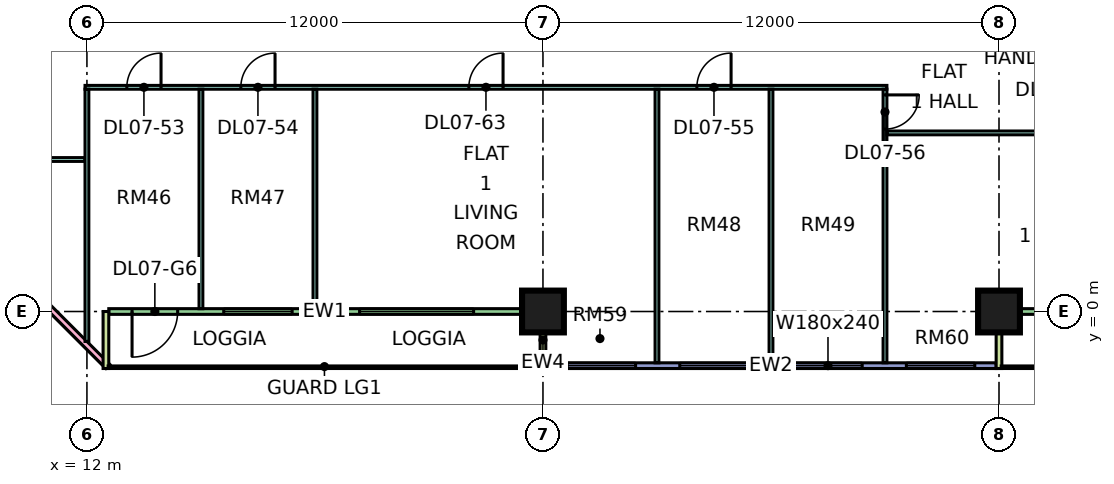
"""IFC4 building model, lengths in metres.
Left out: names, types, materials, properties, quantities, classifications, styles, units other than length and angle.
Written with IfcOpenShell. Run it as: python <this file> out.ifc"""

import sys

from ifc_helpers import new_model, si_unit, direction, frame, frame_2d, origin, origin_2d, place, context, subcontext, project, spatial, rectangle, extrude, element, fill, save


model = new_model("IFC4")
c1 = context("Model", 3, precision=1e-05, world=origin(), true_north=direction((0.0, 1.0)))
c2 = subcontext(c1, "Body", "Model", "MODEL_VIEW")
j1 = project(units=[si_unit("LENGTHUNIT", "METRE"), si_unit("PLANEANGLEUNIT", "RADIAN")], contexts=[c1])
p1 = place(None, origin())
s1 = spatial("IfcSite", under=j1, at=p1, CompositionType="ELEMENT")
p2 = place(p1, origin())
s2 = spatial("IfcBuilding", under=s1, at=p2, CompositionType="ELEMENT")
p3 = place(p2, frame((0.0, 0.0, 41.4)))
s3 = spatial("IfcBuildingStorey", under=s2, at=p3, CompositionType="ELEMENT", Elevation=41.4)
for number, where, z_axis, x_axis in (
    (1, (24.0, 0.0, 0.0), (0.0, 0.0, 1.0), (1.0, 0.0, 0.0)),
    (2, (36.0, 0.0, 0.0), (0.0, 0.0, 1.0), (1.0, 0.0, 0.0)),
):
    element("IfcColumn", number, at=place(p3, frame(where, z_axis=z_axis, x_axis=x_axis)), inside=s3, PredefinedType="COLUMN", context=c2, shape_type="SweptSolid", body=[
        extrude(rectangle(XDim=1.1, YDim=1.1, at=origin_2d()), origin(), (0.0, 0.0, 1.0), 3.75),
    ])
p4 = place(p3, frame((-1.447, 12.553, 0.0), z_axis=(0.0, 0.0, 1.0), x_axis=(0.707106781187, -0.707106781187, 0.0)))
e3 = element("IfcWall", 3, at=p4, inside=s3, PredefinedType="SOLIDWALL", context=c2, shape_type="SweptSolid", body=[
    extrude(rectangle(XDim=19.799, YDim=0.15, at=frame_2d((9.899, 0.0))), origin(), (0.0, 0.0, 1.0), 3.35),
])
p5 = place(p4, frame((2.212, 0.0, 0.45)))
e4 = element("IfcOpeningElement", 4, at=p5, cuts=e3, PredefinedType="OPENING", context=c2, shape_type="SweptSolid", body=[
    extrude(rectangle(XDim=3.0, YDim=2.4, at=frame_2d((1.5, 1.2))), frame((0.0, 0.085, 0.0), z_axis=(0.0, -1.0, 0.0), x_axis=(1.0, 0.0, 0.0)), (0.0, 0.0, 1.0), 0.17),
])
p6 = place(p4, frame((10.216, 0.0, 0.45)))
e5 = element("IfcOpeningElement", 5, at=p6, cuts=e3, PredefinedType="OPENING", context=c2, shape_type="SweptSolid", body=[
    extrude(rectangle(XDim=3.0, YDim=2.4, at=frame_2d((1.5, 1.2))), frame((0.0, 0.085, 0.0), z_axis=(0.0, -1.0, 0.0), x_axis=(1.0, 0.0, 0.0)), (0.0, 0.0, 1.0), 0.17),
])
p7 = place(p3, frame((12.575, 0.0, 0.0), z_axis=(0.0, 0.0, 1.0), x_axis=(1.0, 0.0, 0.0)))
e6 = element("IfcWall", 6, at=p7, inside=s3, PredefinedType="SOLIDWALL", context=c2, shape_type="SweptSolid", body=[
    extrude(rectangle(XDim=11.35, YDim=0.15, at=frame_2d((5.675, 0.0))), origin(), (0.0, 0.0, 1.0), 3.35),
])
p8 = place(p7, frame((0.613, 0.0, 0.0)))
e7 = element("IfcOpeningElement", 7, at=p8, cuts=e6, PredefinedType="OPENING", context=c2, shape_type="SweptSolid", body=[
    extrude(rectangle(XDim=1.2, YDim=2.4, at=frame_2d((0.6, 1.2))), frame((0.0, 0.085, 0.0), z_axis=(0.0, -1.0, 0.0), x_axis=(1.0, 0.0, 0.0)), (0.0, 0.0, 1.0), 0.17),
])
p9 = place(p7, frame((3.025, 0.0, 0.45)))
e8 = element("IfcOpeningElement", 8, at=p9, cuts=e6, PredefinedType="OPENING", context=c2, shape_type="SweptSolid", body=[
    extrude(rectangle(XDim=1.8, YDim=2.4, at=frame_2d((0.9, 1.2))), frame((0.0, 0.085, 0.0), z_axis=(0.0, -1.0, 0.0), x_axis=(1.0, 0.0, 0.0)), (0.0, 0.0, 1.0), 0.17),
])
p10 = place(p7, frame((6.6, 0.0, 0.45)))
e9 = element("IfcOpeningElement", 9, at=p10, cuts=e6, PredefinedType="OPENING", context=c2, shape_type="SweptSolid", body=[
    extrude(rectangle(XDim=3.0, YDim=2.4, at=frame_2d((1.5, 1.2))), frame((0.0, 0.085, 0.0), z_axis=(0.0, -1.0, 0.0), x_axis=(1.0, 0.0, 0.0)), (0.0, 0.0, 1.0), 0.17),
])
for number, where, z_axis, x_axis in (
    (10, (12.5, -1.5, 0.0), (0.0, 0.0, 1.0), (0.0, 1.0, 0.0)),
    (11, (24.0, -1.5, 0.0), (0.0, 0.0, 1.0), (0.0, 1.0, 0.0)),
):
    element("IfcWall", number, at=place(p3, frame(where, z_axis=z_axis, x_axis=x_axis)), inside=s3, PredefinedType="SOLIDWALL", context=c2, shape_type="SweptSolid", body=[
        extrude(rectangle(XDim=1.5, YDim=0.15, at=frame_2d((0.75, 0.0))), origin(), (0.0, 0.0, 1.0), 3.35),
    ])
p11 = place(p3, frame((24.075, -1.425, 0.0), z_axis=(0.0, 0.0, 1.0), x_axis=(1.0, 0.0, 0.0)))
e12 = element("IfcWall", 12, at=p11, inside=s3, PredefinedType="SOLIDWALL", context=c2, shape_type="SweptSolid", body=[
    extrude(rectangle(XDim=11.85, YDim=0.15, at=frame_2d((5.925, 0.0))), origin(), (0.0, 0.0, 1.0), 3.35),
])
p12 = place(p11, frame((0.562, 0.0, 0.45)))
e13 = element("IfcOpeningElement", 13, at=p12, cuts=e12, PredefinedType="OPENING", context=c2, shape_type="SweptSolid", body=[
    extrude(rectangle(XDim=1.8, YDim=2.4, at=frame_2d((0.9, 1.2))), frame((0.0, 0.085, 0.0), z_axis=(0.0, -1.0, 0.0), x_axis=(1.0, 0.0, 0.0)), (0.0, 0.0, 1.0), 0.17),
])
p13 = place(p11, frame((3.525, 0.0, 0.45)))
e14 = element("IfcOpeningElement", 14, at=p13, cuts=e12, PredefinedType="OPENING", context=c2, shape_type="SweptSolid", body=[
    extrude(rectangle(XDim=1.8, YDim=2.4, at=frame_2d((0.9, 1.2))), frame((0.0, 0.085, 0.0), z_axis=(0.0, -1.0, 0.0), x_axis=(1.0, 0.0, 0.0)), (0.0, 0.0, 1.0), 0.17),
])
p14 = place(p11, frame((6.525, 0.0, 0.45)))
e15 = element("IfcOpeningElement", 15, at=p14, cuts=e12, PredefinedType="OPENING", context=c2, shape_type="SweptSolid", body=[
    extrude(rectangle(XDim=1.8, YDim=2.4, at=frame_2d((0.9, 1.2))), frame((0.0, 0.085, 0.0), z_axis=(0.0, -1.0, 0.0), x_axis=(1.0, 0.0, 0.0)), (0.0, 0.0, 1.0), 0.17),
])
p15 = place(p11, frame((9.488, 0.0, 0.45)))
e16 = element("IfcOpeningElement", 16, at=p15, cuts=e12, PredefinedType="OPENING", context=c2, shape_type="SweptSolid", body=[
    extrude(rectangle(XDim=1.8, YDim=2.4, at=frame_2d((0.9, 1.2))), frame((0.0, 0.085, 0.0), z_axis=(0.0, -1.0, 0.0), x_axis=(1.0, 0.0, 0.0)), (0.0, 0.0, 1.0), 0.17),
])
p16 = place(p3, frame((36.075, 0.0, 0.0), z_axis=(0.0, 0.0, 1.0), x_axis=(1.0, 0.0, 0.0)))
e17 = element("IfcWall", 17, at=p16, inside=s3, PredefinedType="SOLIDWALL", context=c2, shape_type="SweptSolid", body=[
    extrude(rectangle(XDim=11.85, YDim=0.15, at=frame_2d((5.925, 0.0))), origin(), (0.0, 0.0, 1.0), 3.35),
])
p17 = place(p16, frame((2.35, 0.0, 0.0)))
e18 = element("IfcOpeningElement", 18, at=p17, cuts=e17, PredefinedType="OPENING", context=c2, shape_type="SweptSolid", body=[
    extrude(rectangle(XDim=1.8, YDim=2.4, at=frame_2d((0.9, 1.2))), frame((0.0, 0.085, 0.0), z_axis=(0.0, -1.0, 0.0), x_axis=(1.0, 0.0, 0.0)), (0.0, 0.0, 1.0), 0.17),
])
p18 = place(p16, frame((6.5, 0.0, 0.45)))
e19 = element("IfcOpeningElement", 19, at=p18, cuts=e17, PredefinedType="OPENING", context=c2, shape_type="SweptSolid", body=[
    extrude(rectangle(XDim=1.2, YDim=2.4, at=frame_2d((0.6, 1.2))), frame((0.0, 0.085, 0.0), z_axis=(0.0, -1.0, 0.0), x_axis=(1.0, 0.0, 0.0)), (0.0, 0.0, 1.0), 0.17),
])
p19 = place(p16, frame((10.113, 0.0, 0.45)))
e20 = element("IfcOpeningElement", 20, at=p19, cuts=e17, PredefinedType="OPENING", context=c2, shape_type="SweptSolid", body=[
    extrude(rectangle(XDim=1.2, YDim=2.4, at=frame_2d((0.6, 1.2))), frame((0.0, 0.085, 0.0), z_axis=(0.0, -1.0, 0.0), x_axis=(1.0, 0.0, 0.0)), (0.0, 0.0, 1.0), 0.17),
])
p20 = place(p3, frame((36.0, -1.5, 0.0), z_axis=(0.0, 0.0, 1.0), x_axis=(0.0, 1.0, 0.0)))
e21 = element("IfcWall", 21, at=p20, inside=s3, PredefinedType="SOLIDWALL", context=c2, shape_type="SweptSolid", body=[
    extrude(rectangle(XDim=1.5, YDim=0.15, at=frame_2d((0.75, 0.0))), origin(), (0.0, 0.0, 1.0), 3.35),
])
p21 = place(p3, frame((9.05, 4.0, 0.0), z_axis=(0.0, 0.0, 1.0), x_axis=(1.0, 0.0, 0.0)))
e22 = element("IfcWall", 22, at=p21, inside=s3, PredefinedType="PARTITIONING", context=c2, shape_type="SweptSolid", body=[
    extrude(rectangle(XDim=2.9, YDim=0.1, at=frame_2d((1.45, 0.0))), origin(), (0.0, 0.0, 1.0), 3.35),
])
p22 = place(p3, frame((11.95, 5.9, 0.0), z_axis=(0.0, 0.0, 1.0), x_axis=(1.0, 0.0, 0.0)))
e23 = element("IfcWall", 23, at=p22, inside=s3, PredefinedType="PARTITIONING", context=c2, shape_type="SweptSolid", body=[
    extrude(rectangle(XDim=21.1, YDim=0.1, at=frame_2d((10.55, 0.0))), origin(), (0.0, 0.0, 1.0), 3.35),
])
p23 = place(p22, frame((1.1, 0.0, 0.0)))
e24 = element("IfcOpeningElement", 24, at=p23, cuts=e23, PredefinedType="OPENING", context=c2, shape_type="SweptSolid", body=[
    extrude(rectangle(XDim=0.9, YDim=2.1, at=frame_2d((0.45, 1.05))), frame((0.0, 0.06, 0.0), z_axis=(0.0, -1.0, 0.0), x_axis=(1.0, 0.0, 0.0)), (0.0, 0.0, 1.0), 0.12),
])
p24 = place(p22, frame((4.1, 0.0, 0.0)))
e25 = element("IfcOpeningElement", 25, at=p24, cuts=e23, PredefinedType="OPENING", context=c2, shape_type="SweptSolid", body=[
    extrude(rectangle(XDim=0.9, YDim=2.1, at=frame_2d((0.45, 1.05))), frame((0.0, 0.06, 0.0), z_axis=(0.0, -1.0, 0.0), x_axis=(1.0, 0.0, 0.0)), (0.0, 0.0, 1.0), 0.12),
])
p25 = place(p22, frame((16.1, 0.0, 0.0)))
e26 = element("IfcOpeningElement", 26, at=p25, cuts=e23, PredefinedType="OPENING", context=c2, shape_type="SweptSolid", body=[
    extrude(rectangle(XDim=0.9, YDim=2.1, at=frame_2d((0.45, 1.05))), frame((0.0, 0.06, 0.0), z_axis=(0.0, -1.0, 0.0), x_axis=(1.0, 0.0, 0.0)), (0.0, 0.0, 1.0), 0.12),
])
p26 = place(p22, frame((10.1, 0.0, 0.0)))
e27 = element("IfcOpeningElement", 27, at=p26, cuts=e23, PredefinedType="OPENING", context=c2, shape_type="SweptSolid", body=[
    extrude(rectangle(XDim=0.9, YDim=2.1, at=frame_2d((0.45, 1.05))), frame((0.0, 0.06, 0.0), z_axis=(0.0, -1.0, 0.0), x_axis=(1.0, 0.0, 0.0)), (0.0, 0.0, 1.0), 0.12),
])
p27 = place(p3, frame((12.0, -0.788, 0.0), z_axis=(0.0, 0.0, 1.0), x_axis=(0.0, 1.0, 0.0)))
e28 = element("IfcWall", 28, at=p27, inside=s3, PredefinedType="PARTITIONING", context=c2, shape_type="SweptSolid", body=[
    extrude(rectangle(XDim=6.638, YDim=0.1, at=frame_2d((3.319, 0.0))), origin(), (0.0, 0.0, 1.0), 3.35),
])
for number, where, z_axis, x_axis in (
    (29, (15.0, 0.074, 0.0), (0.0, 0.0, 1.0), (0.0, 1.0, 0.0)),
    (30, (18.0, 0.074, 0.0), (0.0, 0.0, 1.0), (0.0, 1.0, 0.0)),
):
    element("IfcWall", number, at=place(p3, frame(where, z_axis=z_axis, x_axis=x_axis)), inside=s3, PredefinedType="PARTITIONING", context=c2, shape_type="SweptSolid", body=[
        extrude(rectangle(XDim=5.776, YDim=0.1, at=frame_2d((2.888, 0.0))), origin(), (0.0, 0.0, 1.0), 3.35),
    ])
p28 = place(p3, frame((27.0, -1.35, 0.0), z_axis=(0.0, 0.0, 1.0), x_axis=(0.0, 1.0, 0.0)))
e31 = element("IfcWall", 31, at=p28, inside=s3, PredefinedType="PARTITIONING", context=c2, shape_type="SweptSolid", body=[
    extrude(rectangle(XDim=7.2, YDim=0.1, at=frame_2d((3.6, 0.0))), origin(), (0.0, 0.0, 1.0), 3.35),
])
p29 = place(p3, frame((30.0, -1.351, 0.0), z_axis=(0.0, 0.0, 1.0), x_axis=(0.0, 1.0, 0.0)))
e32 = element("IfcWall", 32, at=p29, inside=s3, PredefinedType="PARTITIONING", context=c2, shape_type="SweptSolid", body=[
    extrude(rectangle(XDim=7.201, YDim=0.1, at=frame_2d((3.601, 0.0))), origin(), (0.0, 0.0, 1.0), 3.35),
])
p30 = place(p3, frame((33.0, -1.35, 0.0), z_axis=(0.0, 0.0, 1.0), x_axis=(0.0, 1.0, 0.0)))
e33 = element("IfcWall", 33, at=p30, inside=s3, PredefinedType="PARTITIONING", context=c2, shape_type="SweptSolid", body=[
    extrude(rectangle(XDim=7.2, YDim=0.1, at=frame_2d((3.6, 0.0))), origin(), (0.0, 0.0, 1.0), 3.35),
])
p31 = place(p30, frame((6.15, 0.0, 0.0)))
e34 = element("IfcOpeningElement", 34, at=p31, cuts=e33, PredefinedType="OPENING", context=c2, shape_type="SweptSolid", body=[
    extrude(rectangle(XDim=0.9, YDim=2.1, at=frame_2d((0.45, 1.05))), frame((0.0, 0.06, 0.0), z_axis=(0.0, -1.0, 0.0), x_axis=(1.0, 0.0, 0.0)), (0.0, 0.0, 1.0), 0.12),
])
p32 = place(p3, frame((33.05, 4.7, 0.0), z_axis=(0.0, 0.0, 1.0), x_axis=(1.0, 0.0, 0.0)))
e35 = element("IfcWall", 35, at=p32, inside=s3, PredefinedType="PARTITIONING", context=c2, shape_type="SweptSolid", body=[
    extrude(rectangle(XDim=14.85, YDim=0.1, at=frame_2d((7.425, 0.0))), origin(), (0.0, 0.0, 1.0), 3.35),
])
p33 = place(p32, frame((10.0, 0.0, 0.0)))
e36 = element("IfcOpeningElement", 36, at=p33, cuts=e35, PredefinedType="OPENING", context=c2, shape_type="SweptSolid", body=[
    extrude(rectangle(XDim=0.9, YDim=2.1, at=frame_2d((0.45, 1.05))), frame((0.0, 0.06, 0.0), z_axis=(0.0, -1.0, 0.0), x_axis=(1.0, 0.0, 0.0)), (0.0, 0.0, 1.0), 0.12),
])
p34 = place(p32, frame((13.0, 0.0, 0.0)))
e37 = element("IfcOpeningElement", 37, at=p34, cuts=e35, PredefinedType="OPENING", context=c2, shape_type="SweptSolid", body=[
    extrude(rectangle(XDim=0.9, YDim=2.1, at=frame_2d((0.45, 1.05))), frame((0.0, 0.06, 0.0), z_axis=(0.0, -1.0, 0.0), x_axis=(1.0, 0.0, 0.0)), (0.0, 0.0, 1.0), 0.12),
])
p35 = place(p32, frame((4.0, 0.0, 0.0)))
e38 = element("IfcOpeningElement", 38, at=p35, cuts=e35, PredefinedType="OPENING", context=c2, shape_type="SweptSolid", body=[
    extrude(rectangle(XDim=0.9, YDim=2.1, at=frame_2d((0.45, 1.05))), frame((0.0, 0.06, 0.0), z_axis=(0.0, -1.0, 0.0), x_axis=(1.0, 0.0, 0.0)), (0.0, 0.0, 1.0), 0.12),
])
p36 = place(p8, frame((1.2, 0.0, 0.0), z_axis=(0.0, 0.0, 1.0), x_axis=(-1.0, 0.0, 0.0)))
e39 = element("IfcDoor", 39, at=p36, inside=s3, OperationType="DOUBLE_DOOR_SINGLE_SWING", PredefinedType="DOOR", context=c2, shape_type="SweptSolid", body=[
    extrude(rectangle(XDim=1.2, YDim=2.4, at=frame_2d((0.6, 1.2))), frame((0.0, 0.025, 0.0), z_axis=(0.0, -1.0, 0.0), x_axis=(1.0, 0.0, 0.0)), (0.0, 0.0, 1.0), 0.05),
])
fill(e7, e39)
p37 = place(p9, origin())
e40 = element("IfcWindow", 40, at=p37, inside=s3, PartitioningType="SINGLE_PANEL", PredefinedType="WINDOW", context=c2, shape_type="SweptSolid", body=[
    extrude(rectangle(XDim=1.8, YDim=2.4, at=frame_2d((0.9, 1.2))), frame((0.0, 0.03, 0.0), z_axis=(0.0, -1.0, 0.0), x_axis=(1.0, 0.0, 0.0)), (0.0, 0.0, 1.0), 0.06),
])
fill(e8, e40)
p38 = place(p10, origin())
e41 = element("IfcWindow", 41, at=p38, inside=s3, PartitioningType="SINGLE_PANEL", PredefinedType="WINDOW", context=c2, shape_type="SweptSolid", body=[
    extrude(rectangle(XDim=3.0, YDim=2.4, at=frame_2d((1.5, 1.2))), frame((0.0, 0.03, 0.0), z_axis=(0.0, -1.0, 0.0), x_axis=(1.0, 0.0, 0.0)), (0.0, 0.0, 1.0), 0.06),
])
fill(e9, e41)
p39 = place(p12, origin())
e42 = element("IfcWindow", 42, at=p39, inside=s3, PartitioningType="SINGLE_PANEL", PredefinedType="WINDOW", context=c2, shape_type="SweptSolid", body=[
    extrude(rectangle(XDim=1.8, YDim=2.4, at=frame_2d((0.9, 1.2))), frame((0.0, 0.03, 0.0), z_axis=(0.0, -1.0, 0.0), x_axis=(1.0, 0.0, 0.0)), (0.0, 0.0, 1.0), 0.06),
])
fill(e13, e42)
p40 = place(p13, origin())
e43 = element("IfcWindow", 43, at=p40, inside=s3, PartitioningType="SINGLE_PANEL", PredefinedType="WINDOW", context=c2, shape_type="SweptSolid", body=[
    extrude(rectangle(XDim=1.8, YDim=2.4, at=frame_2d((0.9, 1.2))), frame((0.0, 0.03, 0.0), z_axis=(0.0, -1.0, 0.0), x_axis=(1.0, 0.0, 0.0)), (0.0, 0.0, 1.0), 0.06),
])
fill(e14, e43)
p41 = place(p14, origin())
e44 = element("IfcWindow", 44, at=p41, inside=s3, PartitioningType="SINGLE_PANEL", PredefinedType="WINDOW", context=c2, shape_type="SweptSolid", body=[
    extrude(rectangle(XDim=1.8, YDim=2.4, at=frame_2d((0.9, 1.2))), frame((0.0, 0.03, 0.0), z_axis=(0.0, -1.0, 0.0), x_axis=(1.0, 0.0, 0.0)), (0.0, 0.0, 1.0), 0.06),
])
fill(e15, e44)
p42 = place(p15, origin())
e45 = element("IfcWindow", 45, at=p42, inside=s3, PartitioningType="SINGLE_PANEL", PredefinedType="WINDOW", context=c2, shape_type="SweptSolid", body=[
    extrude(rectangle(XDim=1.8, YDim=2.4, at=frame_2d((0.9, 1.2))), frame((0.0, 0.03, 0.0), z_axis=(0.0, -1.0, 0.0), x_axis=(1.0, 0.0, 0.0)), (0.0, 0.0, 1.0), 0.06),
])
fill(e16, e45)
p43 = place(p23, frame((0.9, 0.0, 0.0), z_axis=(0.0, 0.0, 1.0), x_axis=(-1.0, 0.0, 0.0)))
e46 = element("IfcDoor", 46, at=p43, inside=s3, OperationType="SINGLE_SWING_RIGHT", PredefinedType="DOOR", context=c2, shape_type="SweptSolid", body=[
    extrude(rectangle(XDim=0.9, YDim=2.1, at=frame_2d((0.45, 1.05))), frame((0.0, 0.025, 0.0), z_axis=(0.0, -1.0, 0.0), x_axis=(1.0, 0.0, 0.0)), (0.0, 0.0, 1.0), 0.05),
])
fill(e24, e46)
p44 = place(p24, frame((0.9, 0.0, 0.0), z_axis=(0.0, 0.0, 1.0), x_axis=(-1.0, 0.0, 0.0)))
e47 = element("IfcDoor", 47, at=p44, inside=s3, OperationType="SINGLE_SWING_RIGHT", PredefinedType="DOOR", context=c2, shape_type="SweptSolid", body=[
    extrude(rectangle(XDim=0.9, YDim=2.1, at=frame_2d((0.45, 1.05))), frame((0.0, 0.025, 0.0), z_axis=(0.0, -1.0, 0.0), x_axis=(1.0, 0.0, 0.0)), (0.0, 0.0, 1.0), 0.05),
])
fill(e25, e47)
p45 = place(p25, frame((0.9, 0.0, 0.0), z_axis=(0.0, 0.0, 1.0), x_axis=(-1.0, 0.0, 0.0)))
e48 = element("IfcDoor", 48, at=p45, inside=s3, OperationType="SINGLE_SWING_RIGHT", PredefinedType="DOOR", context=c2, shape_type="SweptSolid", body=[
    extrude(rectangle(XDim=0.9, YDim=2.1, at=frame_2d((0.45, 1.05))), frame((0.0, 0.025, 0.0), z_axis=(0.0, -1.0, 0.0), x_axis=(1.0, 0.0, 0.0)), (0.0, 0.0, 1.0), 0.05),
])
fill(e26, e48)
p46 = place(p31, origin())
e49 = element("IfcDoor", 49, at=p46, inside=s3, OperationType="SINGLE_SWING_RIGHT", PredefinedType="DOOR", context=c2, shape_type="SweptSolid", body=[
    extrude(rectangle(XDim=0.9, YDim=2.1, at=frame_2d((0.45, 1.05))), frame((0.0, 0.025, 0.0), z_axis=(0.0, -1.0, 0.0), x_axis=(1.0, 0.0, 0.0)), (0.0, 0.0, 1.0), 0.05),
])
fill(e34, e49)
p47 = place(p26, frame((0.9, 0.0, 0.0), z_axis=(0.0, 0.0, 1.0), x_axis=(-1.0, 0.0, 0.0)))
e50 = element("IfcDoor", 50, at=p47, inside=s3, OperationType="SINGLE_SWING_RIGHT", PredefinedType="DOOR", context=c2, shape_type="SweptSolid", body=[
    extrude(rectangle(XDim=0.9, YDim=2.1, at=frame_2d((0.45, 1.05))), frame((0.0, 0.025, 0.0), z_axis=(0.0, -1.0, 0.0), x_axis=(1.0, 0.0, 0.0)), (0.0, 0.0, 1.0), 0.05),
])
fill(e27, e50)
save(model, sys.argv[1])
